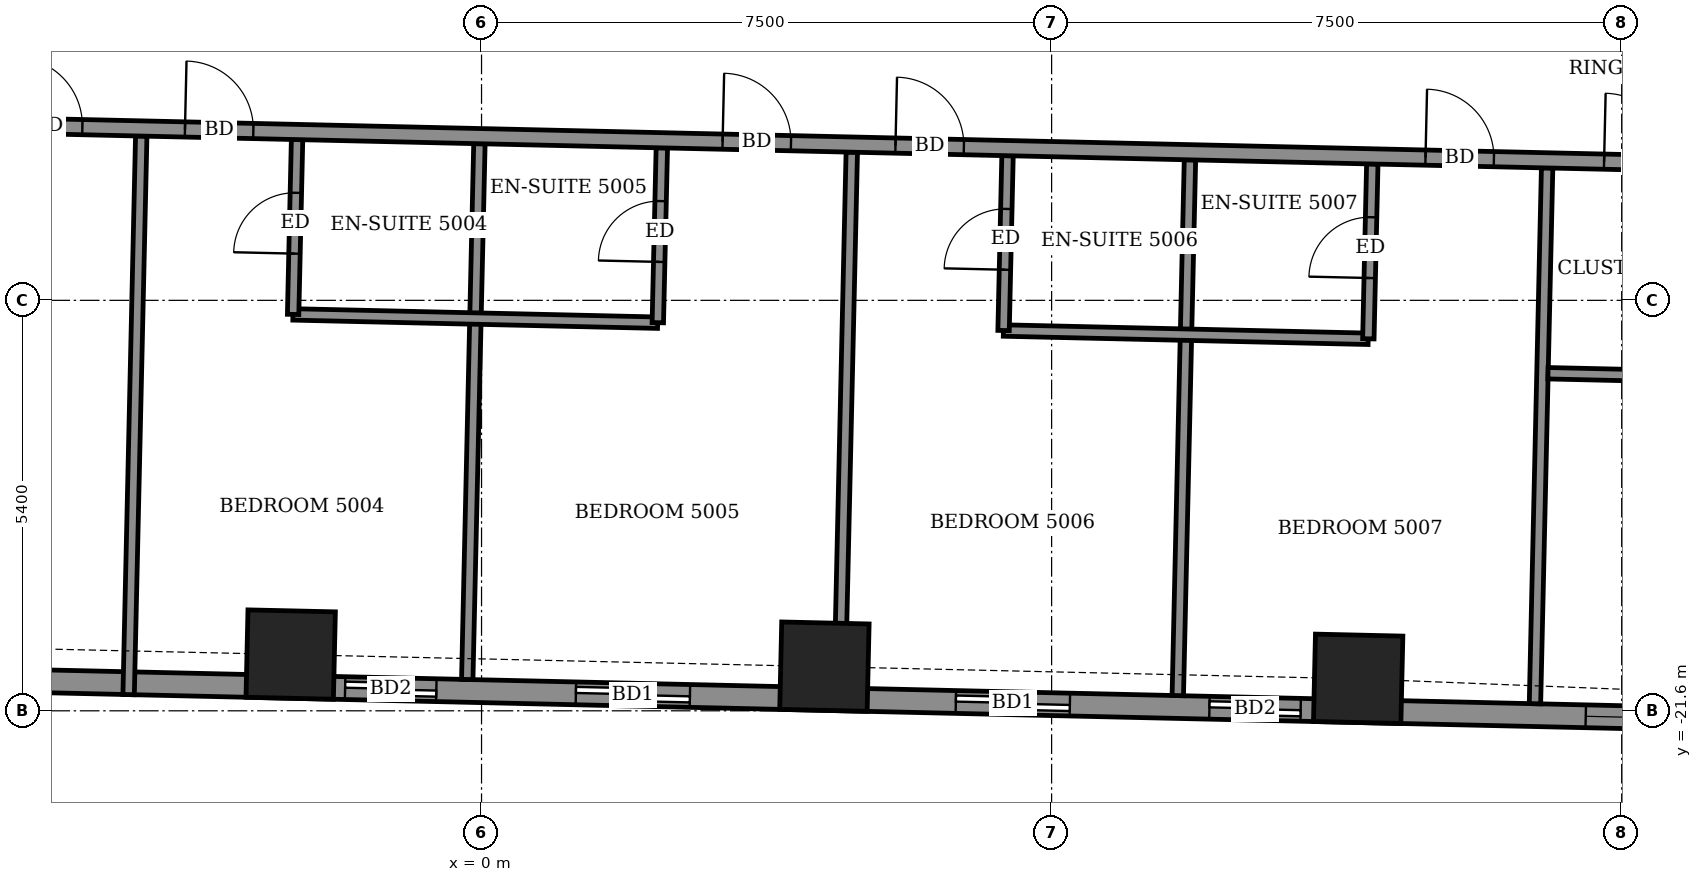
"""IFC4 building model, lengths in metres.
Left out: names, types, materials, properties, quantities, classifications, styles, units other than length and angle.
Written with IfcOpenShell. Run it as: python <this file> out.ifc"""

import sys

from ifc_helpers import new_model, si_unit, direction, frame, frame_2d, origin, origin_2d, place, context, subcontext, project, spatial, rectangle, extrude, element, fill, save


model = new_model("IFC4")
c1 = context("Model", 3, precision=1e-05, world=origin(), true_north=direction((0.0, 1.0)))
c2 = subcontext(c1, "Body", "Model", "MODEL_VIEW")
j1 = project(units=[si_unit("LENGTHUNIT", "METRE"), si_unit("PLANEANGLEUNIT", "RADIAN")], contexts=[c1])
p1 = place(None, origin())
s1 = spatial("IfcSite", under=j1, at=p1, CompositionType="ELEMENT")
p2 = place(p1, origin())
s2 = spatial("IfcBuilding", under=s1, at=p2, CompositionType="ELEMENT")
p3 = place(p2, frame((0.0, 0.0, 197.9)))
s3 = spatial("IfcBuildingStorey", under=s2, at=p3, CompositionType="ELEMENT", Elevation=197.9)
for number, where, z_axis, x_axis in (
    (1, (-2.511, -20.86, -0.55), (0.0, 0.0, 1.0), (1.0, -0.023, 0.0)),
    (2, (4.511, -21.019, -0.55), (0.0, 0.0, 1.0), (1.0, -0.023, 0.0)),
    (3, (11.533, -21.179, -0.55), (0.0, 0.0, 1.0), (1.0, -0.023, 0.0)),
):
    element("IfcColumn", number, at=place(p3, frame(where, z_axis=z_axis, x_axis=x_axis)), inside=s3, PredefinedType="COLUMN", context=c2, shape_type="SweptSolid", body=[
        extrude(rectangle(XDim=1.15, YDim=1.15, at=origin_2d()), origin(), (0.0, 0.0, 1.0), 3.6),
    ])
p4 = place(p3, frame((-23.437, -20.81, 0.0), z_axis=(0.0, 0.0, 1.0), x_axis=(0.999742269115, -0.022702320244, 0.0)))
e4 = element("IfcWall", 4, at=p4, inside=s3, PredefinedType="SOLIDWALL", context=c2, shape_type="SweptSolid", body=[
    extrude(rectangle(XDim=41.844, YDim=0.3, at=frame_2d((20.922, 0.0))), origin(), (0.0, 0.0, 1.0), 2.55),
])
p5 = place(p4, frame((1.899, 0.0, 0.0)))
e5 = element("IfcOpeningElement", 5, at=p5, cuts=e4, PredefinedType="OPENING", context=c2, shape_type="SweptSolid", body=[
    extrude(rectangle(XDim=1.5, YDim=2.4, at=frame_2d((0.75, 1.2))), frame((0.0, 0.16, 0.0), z_axis=(0.0, -1.0, 0.0), x_axis=(1.0, 0.0, 0.0)), (0.0, 0.0, 1.0), 0.32),
])
p6 = place(p4, frame((7.575, 0.0, 0.0)))
e6 = element("IfcOpeningElement", 6, at=p6, cuts=e4, PredefinedType="OPENING", context=c2, shape_type="SweptSolid", body=[
    extrude(rectangle(XDim=1.2, YDim=2.4, at=frame_2d((0.6, 1.2))), frame((0.0, 0.16, 0.0), z_axis=(0.0, -1.0, 0.0), x_axis=(1.0, 0.0, 0.0)), (0.0, 0.0, 1.0), 0.32),
])
p7 = place(p4, frame((10.612, 0.0, 0.0)))
e7 = element("IfcOpeningElement", 7, at=p7, cuts=e4, PredefinedType="OPENING", context=c2, shape_type="SweptSolid", body=[
    extrude(rectangle(XDim=1.5, YDim=2.4, at=frame_2d((0.75, 1.2))), frame((0.0, 0.16, 0.0), z_axis=(0.0, -1.0, 0.0), x_axis=(1.0, 0.0, 0.0)), (0.0, 0.0, 1.0), 0.32),
])
p8 = place(p4, frame((15.762, 0.0, 0.0)))
e8 = element("IfcOpeningElement", 8, at=p8, cuts=e4, PredefinedType="OPENING", context=c2, shape_type="SweptSolid", body=[
    extrude(rectangle(XDim=1.5, YDim=2.4, at=frame_2d((0.75, 1.2))), frame((0.0, 0.16, 0.0), z_axis=(0.0, -1.0, 0.0), x_axis=(1.0, 0.0, 0.0)), (0.0, 0.0, 1.0), 0.32),
])
p9 = place(p4, frame((21.648, 0.0, 0.0)))
e9 = element("IfcOpeningElement", 9, at=p9, cuts=e4, PredefinedType="OPENING", context=c2, shape_type="SweptSolid", body=[
    extrude(rectangle(XDim=1.2, YDim=2.4, at=frame_2d((0.6, 1.2))), frame((0.0, 0.16, 0.0), z_axis=(0.0, -1.0, 0.0), x_axis=(1.0, 0.0, 0.0)), (0.0, 0.0, 1.0), 0.32),
])
p10 = place(p4, frame((24.685, 0.0, 0.0)))
e10 = element("IfcOpeningElement", 10, at=p10, cuts=e4, PredefinedType="OPENING", context=c2, shape_type="SweptSolid", body=[
    extrude(rectangle(XDim=1.5, YDim=2.4, at=frame_2d((0.75, 1.2))), frame((0.0, 0.16, 0.0), z_axis=(0.0, -1.0, 0.0), x_axis=(1.0, 0.0, 0.0)), (0.0, 0.0, 1.0), 0.32),
])
p11 = place(p4, frame((29.685, 0.0, 0.0)))
e11 = element("IfcOpeningElement", 11, at=p11, cuts=e4, PredefinedType="OPENING", context=c2, shape_type="SweptSolid", body=[
    extrude(rectangle(XDim=1.5, YDim=2.4, at=frame_2d((0.75, 1.2))), frame((0.0, 0.16, 0.0), z_axis=(0.0, -1.0, 0.0), x_axis=(1.0, 0.0, 0.0)), (0.0, 0.0, 1.0), 0.32),
])
p12 = place(p4, frame((33.022, 0.0, 0.0)))
e12 = element("IfcOpeningElement", 12, at=p12, cuts=e4, PredefinedType="OPENING", context=c2, shape_type="SweptSolid", body=[
    extrude(rectangle(XDim=1.2, YDim=2.4, at=frame_2d((0.6, 1.2))), frame((0.0, 0.16, 0.0), z_axis=(0.0, -1.0, 0.0), x_axis=(1.0, 0.0, 0.0)), (0.0, 0.0, 1.0), 0.32),
])
p13 = place(p4, frame((37.974, 0.0, 0.9)))
e13 = element("IfcOpeningElement", 13, at=p13, cuts=e4, PredefinedType="OPENING", context=c2, shape_type="SweptSolid", body=[
    extrude(rectangle(XDim=2.4, YDim=1.5, at=frame_2d((1.2, 0.75))), frame((0.0, 0.16, 0.0), z_axis=(0.0, -1.0, 0.0), x_axis=(1.0, 0.0, 0.0)), (0.0, 0.0, 1.0), 0.32),
])
p14 = place(p3, frame((-4.643, -21.387, 0.0), z_axis=(0.0, 0.0, 1.0), x_axis=(0.022587849492, 0.99974486198, 0.0)))
e14 = element("IfcWall", 14, at=p14, inside=s3, PredefinedType="PARTITIONING", context=c2, shape_type="SweptSolid", body=[
    extrude(rectangle(XDim=7.35, YDim=0.15, at=frame_2d((3.675, 0.0))), origin(), (0.0, 0.0, 1.0), 2.55),
])
p15 = place(p3, frame((-0.188, -21.188, 0.0), z_axis=(0.0, 0.0, 1.0), x_axis=(0.022682859663, 0.99974271084, 0.0)))
e15 = element("IfcWall", 15, at=p15, inside=s3, PredefinedType="PARTITIONING", context=c2, shape_type="SweptSolid", body=[
    extrude(rectangle(XDim=7.05, YDim=0.15, at=frame_2d((3.525, 0.0))), origin(), (0.0, 0.0, 1.0), 2.55),
])
p16 = place(p3, frame((4.711, -21.299, 0.0), z_axis=(0.0, 0.0, 1.0), x_axis=(0.022717472124, 0.999741924929, 0.0)))
e16 = element("IfcWall", 16, at=p16, inside=s3, PredefinedType="PARTITIONING", context=c2, shape_type="SweptSolid", body=[
    extrude(rectangle(XDim=7.05, YDim=0.15, at=frame_2d((3.525, 0.0))), origin(), (0.0, 0.0, 1.0), 3.05),
])
p17 = place(p3, frame((9.16, -21.4, 0.0), z_axis=(0.0, 0.0, 1.0), x_axis=(0.022718258661, 0.999741907056, 0.0)))
e17 = element("IfcWall", 17, at=p17, inside=s3, PredefinedType="PARTITIONING", context=c2, shape_type="SweptSolid", body=[
    extrude(rectangle(XDim=7.05, YDim=0.15, at=frame_2d((3.525, 0.0))), origin(), (0.0, 0.0, 1.0), 2.55),
])
p18 = place(p3, frame((13.859, -21.507, 0.0), z_axis=(0.0, 0.0, 1.0), x_axis=(0.022714326521, 0.999741996402, 0.0)))
e18 = element("IfcWall", 18, at=p18, inside=s3, PredefinedType="PARTITIONING", context=c2, shape_type="SweptSolid", body=[
    extrude(rectangle(XDim=7.051, YDim=0.15, at=frame_2d((3.525, 0.0))), origin(), (0.0, 0.0, 1.0), 2.55),
])
p19 = place(p3, frame((14.03, -17.159, 0.0), z_axis=(0.0, 0.0, 1.0), x_axis=(0.999740478815, -0.022781023197, 0.0)))
e19 = element("IfcWall", 19, at=p19, inside=s3, PredefinedType="PARTITIONING", context=c2, shape_type="SweptSolid", body=[
    extrude(rectangle(XDim=2.325, YDim=0.15, at=frame_2d((1.163, 0.0))), origin(), (0.0, 0.0, 1.0), 3.05),
])
p20 = place(p3, frame((-2.481, -16.385, 0.0), z_axis=(0.0, 0.0, 1.0), x_axis=(0.999742570398, -0.022689048768, 0.0)))
e20 = element("IfcWall", 20, at=p20, inside=s3, PredefinedType="PARTITIONING", context=c2, shape_type="SweptSolid", body=[
    extrude(rectangle(XDim=4.799, YDim=0.15, at=frame_2d((2.399, 0.0))), origin(), (0.0, 0.0, 1.0), 3.05),
])
p21 = place(p3, frame((-2.479, -16.385, 0.0), z_axis=(0.0, 0.0, 1.0), x_axis=(0.022603288534, 0.999744513037, 0.0)))
e21 = element("IfcWall", 21, at=p21, inside=s3, PredefinedType="PARTITIONING", context=c2, shape_type="SweptSolid", body=[
    extrude(rectangle(XDim=2.301, YDim=0.15, at=frame_2d((1.15, 0.0))), origin(), (0.0, 0.0, 1.0), 3.05),
])
p22 = place(p21, frame((0.8, 0.0, 0.0)))
e22 = element("IfcOpeningElement", 22, at=p22, cuts=e21, PredefinedType="OPENING", context=c2, shape_type="SweptSolid", body=[
    extrude(rectangle(XDim=0.8, YDim=2.1, at=frame_2d((0.4, 1.05))), frame((0.0, 0.085, 0.0), z_axis=(0.0, -1.0, 0.0), x_axis=(1.0, 0.0, 0.0)), (0.0, 0.0, 1.0), 0.17),
])
p23 = place(p3, frame((2.319, -16.494, 0.0), z_axis=(0.0, 0.0, 1.0), x_axis=(0.023029983665, 0.999734774754, 0.0)))
e23 = element("IfcWall", 23, at=p23, inside=s3, PredefinedType="PARTITIONING", context=c2, shape_type="SweptSolid", body=[
    extrude(rectangle(XDim=2.3, YDim=0.15, at=frame_2d((1.15, 0.0))), origin(), (0.0, 0.0, 1.0), 3.05),
])
p24 = place(p23, frame((0.8, 0.0, 0.0)))
e24 = element("IfcOpeningElement", 24, at=p24, cuts=e23, PredefinedType="OPENING", context=c2, shape_type="SweptSolid", body=[
    extrude(rectangle(XDim=0.8, YDim=2.1, at=frame_2d((0.4, 1.05))), frame((0.0, 0.085, 0.0), z_axis=(0.0, -1.0, 0.0), x_axis=(1.0, 0.0, 0.0)), (0.0, 0.0, 1.0), 0.17),
])
p25 = place(p3, frame((6.866, -16.597, 0.0), z_axis=(0.0, 0.0, 1.0), x_axis=(0.99974154664, -0.022734113616, 0.0)))
e25 = element("IfcWall", 25, at=p25, inside=s3, PredefinedType="PARTITIONING", context=c2, shape_type="SweptSolid", body=[
    extrude(rectangle(XDim=4.8, YDim=0.15, at=frame_2d((2.4, 0.0))), origin(), (0.0, 0.0, 1.0), 3.05),
])
p26 = place(p3, frame((6.868, -16.597, 0.0), z_axis=(0.0, 0.0, 1.0), x_axis=(0.022605686808, 0.999744458811, 0.0)))
e26 = element("IfcWall", 26, at=p26, inside=s3, PredefinedType="PARTITIONING", context=c2, shape_type="SweptSolid", body=[
    extrude(rectangle(XDim=2.3, YDim=0.15, at=frame_2d((1.15, 0.0))), origin(), (0.0, 0.0, 1.0), 3.05),
])
p27 = place(p26, frame((0.8, 0.0, 0.0)))
e27 = element("IfcOpeningElement", 27, at=p27, cuts=e26, PredefinedType="OPENING", context=c2, shape_type="SweptSolid", body=[
    extrude(rectangle(XDim=0.8, YDim=2.1, at=frame_2d((0.4, 1.05))), frame((0.0, 0.085, 0.0), z_axis=(0.0, -1.0, 0.0), x_axis=(1.0, 0.0, 0.0)), (0.0, 0.0, 1.0), 0.17),
])
p28 = place(p3, frame((11.667, -16.706, 0.0), z_axis=(0.0, 0.0, 1.0), x_axis=(0.022603288534, 0.999744513037, 0.0)))
e28 = element("IfcWall", 28, at=p28, inside=s3, PredefinedType="PARTITIONING", context=c2, shape_type="SweptSolid", body=[
    extrude(rectangle(XDim=2.301, YDim=0.15, at=frame_2d((1.15, 0.0))), origin(), (0.0, 0.0, 1.0), 3.05),
])
p29 = place(p28, frame((0.8, 0.0, 0.0)))
e29 = element("IfcOpeningElement", 29, at=p29, cuts=e28, PredefinedType="OPENING", context=c2, shape_type="SweptSolid", body=[
    extrude(rectangle(XDim=0.8, YDim=2.1, at=frame_2d((0.4, 1.05))), frame((0.0, 0.085, 0.0), z_axis=(0.0, -1.0, 0.0), x_axis=(1.0, 0.0, 0.0)), (0.0, 0.0, 1.0), 0.17),
])
p30 = place(p3, frame((-26.421, -13.441, 0.0), z_axis=(0.0, 0.0, 1.0), x_axis=(0.999742754064, -0.022680954485, 0.0)))
e30 = element("IfcWall", 30, at=p30, inside=s3, PredefinedType="PARTITIONING", context=c2, shape_type="SweptSolid", body=[
    extrude(rectangle(XDim=48.945, YDim=0.2, at=frame_2d((24.472, 0.0))), origin(), (0.0, 0.0, 1.0), 3.05),
])
p31 = place(p30, frame((1.375, 0.0, 0.0)))
e31 = element("IfcOpeningElement", 31, at=p31, cuts=e30, PredefinedType="OPENING", context=c2, shape_type="SweptSolid", body=[
    extrude(rectangle(XDim=1.0, YDim=2.1, at=frame_2d((0.5, 1.05))), frame((0.0, 0.11, 0.0), z_axis=(0.0, -1.0, 0.0), x_axis=(1.0, 0.0, 0.0)), (0.0, 0.0, 1.0), 0.22),
])
p32 = place(p30, frame((6.0, 0.0, 0.0)))
e32 = element("IfcOpeningElement", 32, at=p32, cuts=e30, PredefinedType="OPENING", context=c2, shape_type="SweptSolid", body=[
    extrude(rectangle(XDim=0.9, YDim=2.1, at=frame_2d((0.45, 1.05))), frame((0.0, 0.11, 0.0), z_axis=(0.0, -1.0, 0.0), x_axis=(1.0, 0.0, 0.0)), (0.0, 0.0, 1.0), 0.22),
])
p33 = place(p30, frame((10.775, 0.0, 0.0)))
e33 = element("IfcOpeningElement", 33, at=p33, cuts=e30, PredefinedType="OPENING", context=c2, shape_type="SweptSolid", body=[
    extrude(rectangle(XDim=0.9, YDim=2.1, at=frame_2d((0.45, 1.05))), frame((0.0, 0.11, 0.0), z_axis=(0.0, -1.0, 0.0), x_axis=(1.0, 0.0, 0.0)), (0.0, 0.0, 1.0), 0.22),
])
p34 = place(p30, frame((13.05, 0.0, 0.0)))
e34 = element("IfcOpeningElement", 34, at=p34, cuts=e30, PredefinedType="OPENING", context=c2, shape_type="SweptSolid", body=[
    extrude(rectangle(XDim=0.9, YDim=2.1, at=frame_2d((0.45, 1.05))), frame((0.0, 0.11, 0.0), z_axis=(0.0, -1.0, 0.0), x_axis=(1.0, 0.0, 0.0)), (0.0, 0.0, 1.0), 0.22),
])
p35 = place(p30, frame((20.275, 0.0, 0.0)))
e35 = element("IfcOpeningElement", 35, at=p35, cuts=e30, PredefinedType="OPENING", context=c2, shape_type="SweptSolid", body=[
    extrude(rectangle(XDim=0.9, YDim=2.1, at=frame_2d((0.45, 1.05))), frame((0.0, 0.11, 0.0), z_axis=(0.0, -1.0, 0.0), x_axis=(1.0, 0.0, 0.0)), (0.0, 0.0, 1.0), 0.22),
])
p36 = place(p30, frame((22.525, 0.0, 0.0)))
e36 = element("IfcOpeningElement", 36, at=p36, cuts=e30, PredefinedType="OPENING", context=c2, shape_type="SweptSolid", body=[
    extrude(rectangle(XDim=0.9, YDim=2.1, at=frame_2d((0.45, 1.05))), frame((0.0, 0.11, 0.0), z_axis=(0.0, -1.0, 0.0), x_axis=(1.0, 0.0, 0.0)), (0.0, 0.0, 1.0), 0.22),
])
p37 = place(p30, frame((29.6, 0.0, 0.0)))
e37 = element("IfcOpeningElement", 37, at=p37, cuts=e30, PredefinedType="OPENING", context=c2, shape_type="SweptSolid", body=[
    extrude(rectangle(XDim=0.9, YDim=2.1, at=frame_2d((0.45, 1.05))), frame((0.0, 0.11, 0.0), z_axis=(0.0, -1.0, 0.0), x_axis=(1.0, 0.0, 0.0)), (0.0, 0.0, 1.0), 0.22),
])
p38 = place(p30, frame((31.875, 0.0, 0.0)))
e38 = element("IfcOpeningElement", 38, at=p38, cuts=e30, PredefinedType="OPENING", context=c2, shape_type="SweptSolid", body=[
    extrude(rectangle(XDim=0.9, YDim=2.1, at=frame_2d((0.45, 1.05))), frame((0.0, 0.11, 0.0), z_axis=(0.0, -1.0, 0.0), x_axis=(1.0, 0.0, 0.0)), (0.0, 0.0, 1.0), 0.22),
])
p39 = place(p30, frame((38.85, 0.0, 0.0)))
e39 = element("IfcOpeningElement", 39, at=p39, cuts=e30, PredefinedType="OPENING", context=c2, shape_type="SweptSolid", body=[
    extrude(rectangle(XDim=0.9, YDim=2.1, at=frame_2d((0.45, 1.05))), frame((0.0, 0.11, 0.0), z_axis=(0.0, -1.0, 0.0), x_axis=(1.0, 0.0, 0.0)), (0.0, 0.0, 1.0), 0.22),
])
p40 = place(p30, frame((46.097, 0.0, 0.0)))
e40 = element("IfcOpeningElement", 40, at=p40, cuts=e30, PredefinedType="OPENING", context=c2, shape_type="SweptSolid", body=[
    extrude(rectangle(XDim=1.0, YDim=2.1, at=frame_2d((0.5, 1.05))), frame((0.0, 0.11, 0.0), z_axis=(0.0, -1.0, 0.0), x_axis=(1.0, 0.0, 0.0)), (0.0, 0.0, 1.0), 0.22),
])
p41 = place(p30, frame((41.2, 0.0, 0.0)))
e41 = element("IfcOpeningElement", 41, at=p41, cuts=e30, PredefinedType="OPENING", context=c2, shape_type="SweptSolid", body=[
    extrude(rectangle(XDim=0.9, YDim=2.1, at=frame_2d((0.45, 1.05))), frame((0.0, 0.11, 0.0), z_axis=(0.0, -1.0, 0.0), x_axis=(1.0, 0.0, 0.0)), (0.0, 0.0, 1.0), 0.22),
])
p42 = place(p9, origin())
e42 = element("IfcDoor", 42, at=p42, inside=s3, OperationType="SLIDING_TO_LEFT", PredefinedType="DOOR", context=c2, shape_type="SweptSolid", body=[
    extrude(rectangle(XDim=1.2, YDim=2.4, at=frame_2d((0.6, 1.2))), frame((0.0, 0.025, 0.0), z_axis=(0.0, -1.0, 0.0), x_axis=(1.0, 0.0, 0.0)), (0.0, 0.0, 1.0), 0.05),
])
fill(e9, e42)
p43 = place(p10, origin())
e43 = element("IfcDoor", 43, at=p43, inside=s3, OperationType="SLIDING_TO_LEFT", PredefinedType="DOOR", context=c2, shape_type="SweptSolid", body=[
    extrude(rectangle(XDim=1.5, YDim=2.4, at=frame_2d((0.75, 1.2))), frame((0.0, 0.025, 0.0), z_axis=(0.0, -1.0, 0.0), x_axis=(1.0, 0.0, 0.0)), (0.0, 0.0, 1.0), 0.05),
])
fill(e10, e43)
p44 = place(p11, origin())
e44 = element("IfcDoor", 44, at=p44, inside=s3, OperationType="SLIDING_TO_LEFT", PredefinedType="DOOR", context=c2, shape_type="SweptSolid", body=[
    extrude(rectangle(XDim=1.5, YDim=2.4, at=frame_2d((0.75, 1.2))), frame((0.0, 0.025, 0.0), z_axis=(0.0, -1.0, 0.0), x_axis=(1.0, 0.0, 0.0)), (0.0, 0.0, 1.0), 0.05),
])
fill(e11, e44)
p45 = place(p12, origin())
e45 = element("IfcDoor", 45, at=p45, inside=s3, OperationType="SLIDING_TO_LEFT", PredefinedType="DOOR", context=c2, shape_type="SweptSolid", body=[
    extrude(rectangle(XDim=1.2, YDim=2.4, at=frame_2d((0.6, 1.2))), frame((0.0, 0.025, 0.0), z_axis=(0.0, -1.0, 0.0), x_axis=(1.0, 0.0, 0.0)), (0.0, 0.0, 1.0), 0.05),
])
fill(e12, e45)
p46 = place(p13, origin())
e46 = element("IfcWindow", 46, at=p46, inside=s3, PartitioningType="DOUBLE_PANEL_VERTICAL", PredefinedType="WINDOW", context=c2, shape_type="SweptSolid", body=[
    extrude(rectangle(XDim=2.4, YDim=1.5, at=frame_2d((1.2, 0.75))), frame((0.0, 0.03, 0.0), z_axis=(0.0, -1.0, 0.0), x_axis=(1.0, 0.0, 0.0)), (0.0, 0.0, 1.0), 0.06),
])
fill(e13, e46)
p47 = place(p35, origin())
e47 = element("IfcDoor", 47, at=p47, inside=s3, OperationType="SINGLE_SWING_LEFT", PredefinedType="DOOR", context=c2, shape_type="SweptSolid", body=[
    extrude(rectangle(XDim=0.9, YDim=2.1, at=frame_2d((0.45, 1.05))), frame((0.0, 0.025, 0.0), z_axis=(0.0, -1.0, 0.0), x_axis=(1.0, 0.0, 0.0)), (0.0, 0.0, 1.0), 0.05),
])
fill(e35, e47)
p48 = place(p36, origin())
e48 = element("IfcDoor", 48, at=p48, inside=s3, OperationType="SINGLE_SWING_RIGHT", PredefinedType="DOOR", context=c2, shape_type="SweptSolid", body=[
    extrude(rectangle(XDim=0.9, YDim=2.1, at=frame_2d((0.45, 1.05))), frame((0.0, 0.025, 0.0), z_axis=(0.0, -1.0, 0.0), x_axis=(1.0, 0.0, 0.0)), (0.0, 0.0, 1.0), 0.05),
])
fill(e36, e48)
p49 = place(p22, origin())
e49 = element("IfcDoor", 49, at=p49, inside=s3, OperationType="SINGLE_SWING_RIGHT", PredefinedType="DOOR", context=c2, shape_type="SweptSolid", body=[
    extrude(rectangle(XDim=0.8, YDim=2.1, at=frame_2d((0.4, 1.05))), frame((0.0, 0.025, 0.0), z_axis=(0.0, -1.0, 0.0), x_axis=(1.0, 0.0, 0.0)), (0.0, 0.0, 1.0), 0.05),
])
fill(e22, e49)
p50 = place(p37, origin())
e50 = element("IfcDoor", 50, at=p50, inside=s3, OperationType="SINGLE_SWING_LEFT", PredefinedType="DOOR", context=c2, shape_type="SweptSolid", body=[
    extrude(rectangle(XDim=0.9, YDim=2.1, at=frame_2d((0.45, 1.05))), frame((0.0, 0.025, 0.0), z_axis=(0.0, -1.0, 0.0), x_axis=(1.0, 0.0, 0.0)), (0.0, 0.0, 1.0), 0.05),
])
fill(e37, e50)
p51 = place(p24, origin())
e51 = element("IfcDoor", 51, at=p51, inside=s3, OperationType="SINGLE_SWING_LEFT", PredefinedType="DOOR", context=c2, shape_type="SweptSolid", body=[
    extrude(rectangle(XDim=0.8, YDim=2.1, at=frame_2d((0.4, 1.05))), frame((0.0, 0.025, 0.0), z_axis=(0.0, -1.0, 0.0), x_axis=(1.0, 0.0, 0.0)), (0.0, 0.0, 1.0), 0.05),
])
fill(e24, e51)
p52 = place(p38, origin())
e52 = element("IfcDoor", 52, at=p52, inside=s3, OperationType="SINGLE_SWING_RIGHT", PredefinedType="DOOR", context=c2, shape_type="SweptSolid", body=[
    extrude(rectangle(XDim=0.9, YDim=2.1, at=frame_2d((0.45, 1.05))), frame((0.0, 0.025, 0.0), z_axis=(0.0, -1.0, 0.0), x_axis=(1.0, 0.0, 0.0)), (0.0, 0.0, 1.0), 0.05),
])
fill(e38, e52)
p53 = place(p27, origin())
e53 = element("IfcDoor", 53, at=p53, inside=s3, OperationType="SINGLE_SWING_RIGHT", PredefinedType="DOOR", context=c2, shape_type="SweptSolid", body=[
    extrude(rectangle(XDim=0.8, YDim=2.1, at=frame_2d((0.4, 1.05))), frame((0.0, 0.025, 0.0), z_axis=(0.0, -1.0, 0.0), x_axis=(1.0, 0.0, 0.0)), (0.0, 0.0, 1.0), 0.05),
])
fill(e27, e53)
p54 = place(p39, origin())
e54 = element("IfcDoor", 54, at=p54, inside=s3, OperationType="SINGLE_SWING_LEFT", PredefinedType="DOOR", context=c2, shape_type="SweptSolid", body=[
    extrude(rectangle(XDim=0.9, YDim=2.1, at=frame_2d((0.45, 1.05))), frame((0.0, 0.025, 0.0), z_axis=(0.0, -1.0, 0.0), x_axis=(1.0, 0.0, 0.0)), (0.0, 0.0, 1.0), 0.05),
])
fill(e39, e54)
p55 = place(p29, origin())
e55 = element("IfcDoor", 55, at=p55, inside=s3, OperationType="SINGLE_SWING_LEFT", PredefinedType="DOOR", context=c2, shape_type="SweptSolid", body=[
    extrude(rectangle(XDim=0.8, YDim=2.1, at=frame_2d((0.4, 1.05))), frame((0.0, 0.025, 0.0), z_axis=(0.0, -1.0, 0.0), x_axis=(1.0, 0.0, 0.0)), (0.0, 0.0, 1.0), 0.05),
])
fill(e29, e55)
p56 = place(p41, origin())
e56 = element("IfcDoor", 56, at=p56, inside=s3, OperationType="SINGLE_SWING_RIGHT", PredefinedType="DOOR", context=c2, shape_type="SweptSolid", body=[
    extrude(rectangle(XDim=0.9, YDim=2.1, at=frame_2d((0.45, 1.05))), frame((0.0, 0.025, 0.0), z_axis=(0.0, -1.0, 0.0), x_axis=(1.0, 0.0, 0.0)), (0.0, 0.0, 1.0), 0.05),
])
fill(e41, e56)
save(model, sys.argv[1])
